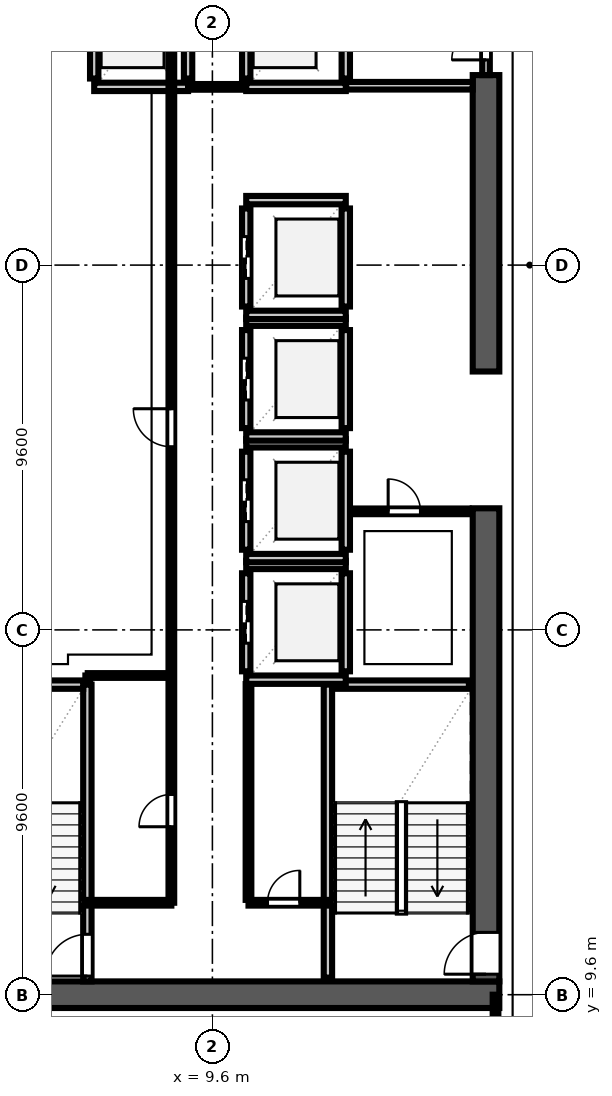
"""IFC4 building model, lengths in metres.
Left out: names, types, materials, properties, quantities, classifications, styles, units other than length and angle.
Written with IfcOpenShell. Run it as: python <this file> out.ifc"""

import sys

from ifc_helpers import new_model, si_unit, direction, frame, frame_2d, origin, place, context, subcontext, project, spatial, rectangle, extrude, element, fill, save


model = new_model("IFC4")
c1 = context("Model", 3, precision=1e-05, world=origin(), true_north=direction((0.0, 1.0)))
c2 = subcontext(c1, "Body", "Model", "MODEL_VIEW")
j1 = project(units=[si_unit("LENGTHUNIT", "METRE"), si_unit("PLANEANGLEUNIT", "RADIAN")], contexts=[c1])
p1 = place(None, origin())
s1 = spatial("IfcSite", under=j1, at=p1, CompositionType="ELEMENT")
p2 = place(p1, origin())
s2 = spatial("IfcBuilding", under=s1, at=p2, CompositionType="ELEMENT")
p3 = place(p2, frame((0.0, 0.0, 190.2)))
s3 = spatial("IfcBuildingStorey", under=s2, at=p3, CompositionType="ELEMENT", Elevation=190.2)
p4 = place(p3, frame((2.55, 9.6, 0.0), z_axis=(0.0, 0.0, 1.0), x_axis=(1.0, 0.0, 0.0)))
e1 = element("IfcWall", 1, at=p4, inside=s3, PredefinedType="SHEAR", context=c2, shape_type="SweptSolid", body=[
    extrude(rectangle(XDim=14.6, YDim=0.7, at=frame_2d((7.3, 0.0))), origin(), (0.0, 0.0, 1.0), 3.48),
])
p5 = place(p3, frame((16.8, 9.95, 0.0), z_axis=(0.0, 0.0, 1.0), x_axis=(0.0, 1.0, 0.0)))
e2 = element("IfcWall", 2, at=p5, inside=s3, PredefinedType="SHEAR", context=c2, shape_type="SweptSolid", body=[
    extrude(rectangle(XDim=12.45, YDim=0.7, at=frame_2d((6.225, 0.0))), origin(), (0.0, 0.0, 1.0), 3.48),
])
p6 = place(p5, frame((0.19, 0.0, 0.0)))
e3 = element("IfcOpeningElement", 3, at=p6, cuts=e2, PredefinedType="OPENING", context=c2, shape_type="SweptSolid", body=[
    extrude(rectangle(XDim=1.1, YDim=2.2, at=frame_2d((0.55, 1.1))), frame((0.0, 0.362, 0.0), z_axis=(0.0, -1.0, 0.0), x_axis=(1.0, 0.0, 0.0)), (0.0, 0.0, 1.0), 0.724),
])
p7 = place(p3, frame((16.8, 26.0, 0.0), z_axis=(0.0, 0.0, 1.0), x_axis=(0.0, 1.0, 0.0)))
e4 = element("IfcWall", 4, at=p7, inside=s3, PredefinedType="SHEAR", context=c2, shape_type="SweptSolid", body=[
    extrude(rectangle(XDim=7.8, YDim=0.7, at=frame_2d((3.9, 0.0))), origin(), (0.0, 0.0, 1.0), 3.48),
])
p8 = place(p3, frame((6.31, 9.95, 0.0), z_axis=(0.0, 0.0, 1.0), x_axis=(0.0, 1.0, 0.0)))
e5 = element("IfcWall", 5, at=p8, inside=s3, PredefinedType="SOLIDWALL", context=c2, shape_type="SweptSolid", body=[
    extrude(rectangle(XDim=7.81, YDim=0.22, at=frame_2d((3.905, 0.0))), origin(), (0.0, 0.0, 1.0), 3.48),
])
p9 = place(p8, frame((0.14, 0.0, 0.0)))
e6 = element("IfcOpeningElement", 6, at=p9, cuts=e5, PredefinedType="OPENING", context=c2, shape_type="SweptSolid", body=[
    extrude(rectangle(XDim=1.1, YDim=2.2, at=frame_2d((0.55, 1.1))), frame((0.0, 0.122, 0.0), z_axis=(0.0, -1.0, 0.0), x_axis=(1.0, 0.0, 0.0)), (0.0, 0.0, 1.0), 0.244),
])
p10 = place(p3, frame((2.65, 17.76, 0.0), z_axis=(0.0, 0.0, 1.0), x_axis=(1.0, 0.0, 0.0)))
e7 = element("IfcWall", 7, at=p10, inside=s3, PredefinedType="SOLIDWALL", context=c2, shape_type="SweptSolid", body=[
    extrude(rectangle(XDim=3.55, YDim=0.22, at=frame_2d((1.775, 0.0))), origin(), (0.0, 0.0, 1.0), 3.48),
])
p11 = place(p3, frame((12.64, 10.05, 0.0), z_axis=(0.0, 0.0, 1.0), x_axis=(0.0, 1.0, 0.0)))
e8 = element("IfcWall", 8, at=p11, inside=s3, PredefinedType="SOLIDWALL", context=c2, shape_type="SweptSolid", body=[
    extrude(rectangle(XDim=7.71, YDim=0.22, at=frame_2d((3.855, 0.0))), origin(), (0.0, 0.0, 1.0), 3.48),
])
p12 = place(p3, frame((12.75, 17.76, 0.0), z_axis=(0.0, 0.0, 1.0), x_axis=(1.0, 0.0, 0.0)))
e9 = element("IfcWall", 9, at=p12, inside=s3, PredefinedType="SOLIDWALL", context=c2, shape_type="SweptSolid", body=[
    extrude(rectangle(XDim=3.6, YDim=0.22, at=frame_2d((1.8, 0.0))), origin(), (0.0, 0.0, 1.0), 3.48),
])
p13 = place(p3, frame((10.49, 18.11, 0.0), z_axis=(0.0, 0.0, 1.0), x_axis=(0.0, 1.0, 0.0)))
e10 = element("IfcWall", 10, at=p13, inside=s3, PredefinedType="SOLIDWALL", context=c2, shape_type="SweptSolid", body=[
    extrude(rectangle(XDim=2.58, YDim=0.22, at=frame_2d((1.29, 0.0))), origin(), (0.0, 0.0, 1.0), 3.48),
])
p14 = place(p13, frame((0.74, 0.0, 0.0)))
e11 = element("IfcOpeningElement", 11, at=p14, cuts=e10, PredefinedType="OPENING", context=c2, shape_type="SweptSolid", body=[
    extrude(rectangle(XDim=1.1, YDim=2.2, at=frame_2d((0.55, 1.1))), frame((0.0, 0.122, 0.0), z_axis=(0.0, -1.0, 0.0), x_axis=(1.0, 0.0, 0.0)), (0.0, 0.0, 1.0), 0.244),
])
p15 = place(p3, frame((13.11, 18.11, 0.0), z_axis=(0.0, 0.0, 1.0), x_axis=(0.0, 1.0, 0.0)))
e12 = element("IfcWall", 12, at=p15, inside=s3, PredefinedType="SOLIDWALL", context=c2, shape_type="SweptSolid", body=[
    extrude(rectangle(XDim=2.58, YDim=0.22, at=frame_2d((1.29, 0.0))), origin(), (0.0, 0.0, 1.0), 3.48),
])
for number, where, z_axis, x_axis in (
    (13, (10.49, 17.89, 0.0), (0.0, 0.0, 1.0), (1.0, 0.0, 0.0)),
    (14, (10.49, 20.91, 0.0), (0.0, 0.0, 1.0), (1.0, 0.0, 0.0)),
):
    element("IfcWall", number, at=place(p3, frame(where, z_axis=z_axis, x_axis=x_axis)), inside=s3, PredefinedType="SOLIDWALL", context=c2, shape_type="SweptSolid", body=[
        extrude(rectangle(XDim=2.62, YDim=0.22, at=frame_2d((1.31, 0.0))), origin(), (0.0, 0.0, 1.0), 3.48),
    ])
p16 = place(p3, frame((10.49, 21.31, 0.0), z_axis=(0.0, 0.0, 1.0), x_axis=(0.0, 1.0, 0.0)))
e15 = element("IfcWall", 15, at=p16, inside=s3, PredefinedType="SOLIDWALL", context=c2, shape_type="SweptSolid", body=[
    extrude(rectangle(XDim=2.58, YDim=0.22, at=frame_2d((1.29, 0.0))), origin(), (0.0, 0.0, 1.0), 3.48),
])
p17 = place(p16, frame((0.74, 0.0, 0.0)))
e16 = element("IfcOpeningElement", 16, at=p17, cuts=e15, PredefinedType="OPENING", context=c2, shape_type="SweptSolid", body=[
    extrude(rectangle(XDim=1.1, YDim=2.2, at=frame_2d((0.55, 1.1))), frame((0.0, 0.122, 0.0), z_axis=(0.0, -1.0, 0.0), x_axis=(1.0, 0.0, 0.0)), (0.0, 0.0, 1.0), 0.244),
])
p18 = place(p3, frame((13.11, 21.31, 0.0), z_axis=(0.0, 0.0, 1.0), x_axis=(0.0, 1.0, 0.0)))
e17 = element("IfcWall", 17, at=p18, inside=s3, PredefinedType="SOLIDWALL", context=c2, shape_type="SweptSolid", body=[
    extrude(rectangle(XDim=2.58, YDim=0.22, at=frame_2d((1.29, 0.0))), origin(), (0.0, 0.0, 1.0), 3.48),
])
for number, where, z_axis, x_axis in (
    (18, (10.49, 21.09, 0.0), (0.0, 0.0, 1.0), (1.0, 0.0, 0.0)),
    (19, (10.49, 24.11, 0.0), (0.0, 0.0, 1.0), (1.0, 0.0, 0.0)),
):
    element("IfcWall", number, at=place(p3, frame(where, z_axis=z_axis, x_axis=x_axis)), inside=s3, PredefinedType="SOLIDWALL", context=c2, shape_type="SweptSolid", body=[
        extrude(rectangle(XDim=2.62, YDim=0.22, at=frame_2d((1.31, 0.0))), origin(), (0.0, 0.0, 1.0), 3.48),
    ])
p19 = place(p3, frame((10.49, 24.51, 0.0), z_axis=(0.0, 0.0, 1.0), x_axis=(0.0, 1.0, 0.0)))
e20 = element("IfcWall", 20, at=p19, inside=s3, PredefinedType="SOLIDWALL", context=c2, shape_type="SweptSolid", body=[
    extrude(rectangle(XDim=2.58, YDim=0.22, at=frame_2d((1.29, 0.0))), origin(), (0.0, 0.0, 1.0), 3.48),
])
p20 = place(p19, frame((0.74, 0.0, 0.0)))
e21 = element("IfcOpeningElement", 21, at=p20, cuts=e20, PredefinedType="OPENING", context=c2, shape_type="SweptSolid", body=[
    extrude(rectangle(XDim=1.1, YDim=2.2, at=frame_2d((0.55, 1.1))), frame((0.0, 0.122, 0.0), z_axis=(0.0, -1.0, 0.0), x_axis=(1.0, 0.0, 0.0)), (0.0, 0.0, 1.0), 0.244),
])
p21 = place(p3, frame((13.11, 24.51, 0.0), z_axis=(0.0, 0.0, 1.0), x_axis=(0.0, 1.0, 0.0)))
e22 = element("IfcWall", 22, at=p21, inside=s3, PredefinedType="SOLIDWALL", context=c2, shape_type="SweptSolid", body=[
    extrude(rectangle(XDim=2.58, YDim=0.22, at=frame_2d((1.29, 0.0))), origin(), (0.0, 0.0, 1.0), 3.48),
])
for number, where, z_axis, x_axis in (
    (23, (10.49, 24.29, 0.0), (0.0, 0.0, 1.0), (1.0, 0.0, 0.0)),
    (24, (10.49, 27.31, 0.0), (0.0, 0.0, 1.0), (1.0, 0.0, 0.0)),
):
    element("IfcWall", number, at=place(p3, frame(where, z_axis=z_axis, x_axis=x_axis)), inside=s3, PredefinedType="SOLIDWALL", context=c2, shape_type="SweptSolid", body=[
        extrude(rectangle(XDim=2.62, YDim=0.22, at=frame_2d((1.31, 0.0))), origin(), (0.0, 0.0, 1.0), 3.48),
    ])
p22 = place(p3, frame((10.49, 27.71, 0.0), z_axis=(0.0, 0.0, 1.0), x_axis=(0.0, 1.0, 0.0)))
e25 = element("IfcWall", 25, at=p22, inside=s3, PredefinedType="SOLIDWALL", context=c2, shape_type="SweptSolid", body=[
    extrude(rectangle(XDim=2.58, YDim=0.22, at=frame_2d((1.29, 0.0))), origin(), (0.0, 0.0, 1.0), 3.48),
])
p23 = place(p22, frame((0.74, 0.0, 0.0)))
e26 = element("IfcOpeningElement", 26, at=p23, cuts=e25, PredefinedType="OPENING", context=c2, shape_type="SweptSolid", body=[
    extrude(rectangle(XDim=1.1, YDim=2.2, at=frame_2d((0.55, 1.1))), frame((0.0, 0.122, 0.0), z_axis=(0.0, -1.0, 0.0), x_axis=(1.0, 0.0, 0.0)), (0.0, 0.0, 1.0), 0.244),
])
p24 = place(p3, frame((13.11, 27.71, 0.0), z_axis=(0.0, 0.0, 1.0), x_axis=(0.0, 1.0, 0.0)))
e27 = element("IfcWall", 27, at=p24, inside=s3, PredefinedType="SOLIDWALL", context=c2, shape_type="SweptSolid", body=[
    extrude(rectangle(XDim=2.58, YDim=0.22, at=frame_2d((1.29, 0.0))), origin(), (0.0, 0.0, 1.0), 3.48),
])
for number, where, z_axis, x_axis in (
    (28, (10.49, 27.49, 0.0), (0.0, 0.0, 1.0), (1.0, 0.0, 0.0)),
    (29, (10.49, 30.51, 0.0), (0.0, 0.0, 1.0), (1.0, 0.0, 0.0)),
):
    element("IfcWall", number, at=place(p3, frame(where, z_axis=z_axis, x_axis=x_axis)), inside=s3, PredefinedType="SOLIDWALL", context=c2, shape_type="SweptSolid", body=[
        extrude(rectangle(XDim=2.62, YDim=0.22, at=frame_2d((1.31, 0.0))), origin(), (0.0, 0.0, 1.0), 3.48),
    ])
for number, where, z_axis, x_axis in (
    (30, (6.49, 33.71, 0.0), (0.0, 0.0, 1.0), (0.0, 1.0, 0.0)),
    (31, (8.96, 33.71, 0.0), (0.0, 0.0, 1.0), (0.0, 1.0, 0.0)),
):
    element("IfcWall", number, at=place(p3, frame(where, z_axis=z_axis, x_axis=x_axis)), inside=s3, PredefinedType="SOLIDWALL", context=c2, shape_type="SweptSolid", body=[
        extrude(rectangle(XDim=2.78, YDim=0.22, at=frame_2d((1.39, 0.0))), origin(), (0.0, 0.0, 1.0), 3.48),
    ])
p25 = place(p3, frame((6.49, 33.49, 0.0), z_axis=(0.0, 0.0, 1.0), x_axis=(1.0, 0.0, 0.0)))
e32 = element("IfcWall", 32, at=p25, inside=s3, PredefinedType="SOLIDWALL", context=c2, shape_type="SweptSolid", body=[
    extrude(rectangle(XDim=2.47, YDim=0.22, at=frame_2d((1.235, 0.0))), origin(), (0.0, 0.0, 1.0), 3.48),
])
for number, where, z_axis, x_axis in (
    (33, (10.49, 33.71, 0.0), (0.0, 0.0, 1.0), (0.0, 1.0, 0.0)),
    (34, (13.11, 33.71, 0.0), (0.0, 0.0, 1.0), (0.0, 1.0, 0.0)),
):
    element("IfcWall", number, at=place(p3, frame(where, z_axis=z_axis, x_axis=x_axis)), inside=s3, PredefinedType="SOLIDWALL", context=c2, shape_type="SweptSolid", body=[
        extrude(rectangle(XDim=2.78, YDim=0.22, at=frame_2d((1.39, 0.0))), origin(), (0.0, 0.0, 1.0), 3.48),
    ])
p26 = place(p3, frame((10.49, 33.49, 0.0), z_axis=(0.0, 0.0, 1.0), x_axis=(1.0, 0.0, 0.0)))
e35 = element("IfcWall", 35, at=p26, inside=s3, PredefinedType="SOLIDWALL", context=c2, shape_type="SweptSolid", body=[
    extrude(rectangle(XDim=2.62, YDim=0.22, at=frame_2d((1.31, 0.0))), origin(), (0.0, 0.0, 1.0), 3.48),
])
p27 = place(p3, frame((13.12, 33.52, 0.0), z_axis=(0.0, 0.0, 1.0), x_axis=(1.0, 0.0, 0.0)))
e36 = element("IfcWall", 36, at=p27, inside=s3, PredefinedType="SOLIDWALL", context=c2, shape_type="SweptSolid", body=[
    extrude(rectangle(XDim=3.33, YDim=0.2, at=frame_2d((1.665, 0.0))), origin(), (0.0, 0.0, 1.0), 3.48),
])
p28 = place(p3, frame((16.8, 33.8, 0.0), z_axis=(0.0, 0.0, 1.0), x_axis=(0.0, 1.0, 0.0)))
e37 = element("IfcWall", 37, at=p28, inside=s3, PredefinedType="SOLIDWALL", context=c2, shape_type="SweptSolid", body=[
    extrude(rectangle(XDim=2.6, YDim=0.2, at=frame_2d((1.3, 0.0))), origin(), (0.0, 0.0, 1.0), 3.48),
])
p29 = place(p28, frame((0.4, 0.0, 0.0)))
e38 = element("IfcOpeningElement", 38, at=p29, cuts=e37, PredefinedType="OPENING", context=c2, shape_type="SweptSolid", body=[
    extrude(rectangle(XDim=1.8, YDim=2.2, at=frame_2d((0.9, 1.1))), frame((0.0, 0.112, 0.0), z_axis=(0.0, -1.0, 0.0), x_axis=(1.0, 0.0, 0.0)), (0.0, 0.0, 1.0), 0.224),
])
p30 = place(p3, frame((8.965, 33.49, 0.0), z_axis=(0.0, 0.0, 1.0), x_axis=(1.0, 0.0, 0.0)))
e39 = element("IfcWall", 39, at=p30, inside=s3, PredefinedType="PARTITIONING", context=c2, shape_type="SweptSolid", body=[
    extrude(rectangle(XDim=1.52, YDim=0.15, at=frame_2d((0.76, 0.0))), origin(), (0.0, 0.0, 1.0), 3.48),
])
p31 = place(p3, frame((10.55, 12.02, 0.0), z_axis=(0.0, 0.0, 1.0), x_axis=(1.0, 0.0, 0.0)))
e40 = element("IfcWall", 40, at=p31, inside=s3, PredefinedType="PARTITIONING", context=c2, shape_type="SweptSolid", body=[
    extrude(rectangle(XDim=2.08, YDim=0.15, at=frame_2d((1.04, 0.0))), origin(), (0.0, 0.0, 1.0), 3.48),
])
p32 = place(p31, frame((0.5, 0.0, 0.0)))
e41 = element("IfcOpeningElement", 41, at=p32, cuts=e40, PredefinedType="OPENING", context=c2, shape_type="SweptSolid", body=[
    extrude(rectangle(XDim=0.85, YDim=2.1, at=frame_2d((0.425, 1.05))), frame((0.0, 0.087, 0.0), z_axis=(0.0, -1.0, 0.0), x_axis=(1.0, 0.0, 0.0)), (0.0, 0.0, 1.0), 0.174),
])
p33 = place(p3, frame((10.55, 12.095, 0.0), z_axis=(0.0, 0.0, 1.0), x_axis=(0.0, 1.0, 0.0)))
e42 = element("IfcWall", 42, at=p33, inside=s3, PredefinedType="PARTITIONING", context=c2, shape_type="SweptSolid", body=[
    extrude(rectangle(XDim=5.68, YDim=0.15, at=frame_2d((2.84, 0.0))), origin(), (0.0, 0.0, 1.0), 3.48),
])
p34 = place(p3, frame((13.225, 22.32, 0.0), z_axis=(0.0, 0.0, 1.0), x_axis=(1.0, 0.0, 0.0)))
e43 = element("IfcWall", 43, at=p34, inside=s3, PredefinedType="PARTITIONING", context=c2, shape_type="SweptSolid", body=[
    extrude(rectangle(XDim=3.12, YDim=0.15, at=frame_2d((1.56, 0.0))), origin(), (0.0, 0.0, 1.0), 3.48),
])
p35 = place(p34, frame((1.0, 0.0, 0.0)))
e44 = element("IfcOpeningElement", 44, at=p35, cuts=e43, PredefinedType="OPENING", context=c2, shape_type="SweptSolid", body=[
    extrude(rectangle(XDim=0.85, YDim=2.1, at=frame_2d((0.425, 1.05))), frame((0.0, 0.087, 0.0), z_axis=(0.0, -1.0, 0.0), x_axis=(1.0, 0.0, 0.0)), (0.0, 0.0, 1.0), 0.174),
])
p36 = place(p3, frame((6.32, 12.02, 0.0), z_axis=(0.0, 0.0, 1.0), x_axis=(1.0, 0.0, 0.0)))
e45 = element("IfcWall", 45, at=p36, inside=s3, PredefinedType="PARTITIONING", context=c2, shape_type="SweptSolid", body=[
    extrude(rectangle(XDim=2.2, YDim=0.15, at=frame_2d((1.1, 0.0))), origin(), (0.0, 0.0, 1.0), 3.48),
])
p37 = place(p3, frame((6.32, 17.8, 0.0), z_axis=(0.0, 0.0, 1.0), x_axis=(0.0, 1.0, 0.0)))
e46 = element("IfcWall", 46, at=p37, inside=s3, PredefinedType="PARTITIONING", context=c2, shape_type="SweptSolid", body=[
    extrude(rectangle(XDim=0.2, YDim=0.125, at=frame_2d((0.1, 0.0))), origin(), (0.0, 0.0, 1.0), 3.48),
])
p38 = place(p3, frame((6.32, 18.0, 0.0), z_axis=(0.0, 0.0, 1.0), x_axis=(1.0, 0.0, 0.0)))
e47 = element("IfcWall", 47, at=p38, inside=s3, PredefinedType="PARTITIONING", context=c2, shape_type="SweptSolid", body=[
    extrude(rectangle(XDim=2.2, YDim=0.125, at=frame_2d((1.1, 0.0))), origin(), (0.0, 0.0, 1.0), 3.48),
])
p39 = place(p3, frame((8.52, 12.02, 0.0), z_axis=(0.0, 0.0, 1.0), x_axis=(0.0, 1.0, 0.0)))
e48 = element("IfcWall", 48, at=p39, inside=s3, PredefinedType="PARTITIONING", context=c2, shape_type="SweptSolid", body=[
    extrude(rectangle(XDim=24.76, YDim=0.15, at=frame_2d((12.38, 0.0))), origin(), (0.0, 0.0, 1.0), 3.48),
])
p40 = place(p39, frame((2.0, 0.0, 0.0)))
e49 = element("IfcOpeningElement", 49, at=p40, cuts=e48, PredefinedType="OPENING", context=c2, shape_type="SweptSolid", body=[
    extrude(rectangle(XDim=0.85, YDim=2.1, at=frame_2d((0.425, 1.05))), frame((0.0, 0.087, 0.0), z_axis=(0.0, -1.0, 0.0), x_axis=(1.0, 0.0, 0.0)), (0.0, 0.0, 1.0), 0.174),
])
p41 = place(p39, frame((12.0, 0.0, 0.0)))
e50 = element("IfcOpeningElement", 50, at=p41, cuts=e48, PredefinedType="OPENING", context=c2, shape_type="SweptSolid", body=[
    extrude(rectangle(XDim=1.0, YDim=2.2, at=frame_2d((0.5, 1.1))), frame((0.0, 0.087, 0.0), z_axis=(0.0, -1.0, 0.0), x_axis=(1.0, 0.0, 0.0)), (0.0, 0.0, 1.0), 0.174),
])
p42 = place(p3, frame((17.05, 0.22, 0.0), z_axis=(0.0, 0.0, 1.0), x_axis=(0.0, 1.0, 0.0)))
e51 = element("IfcWall", 51, at=p42, inside=s3, PredefinedType="PARTITIONING", context=c2, shape_type="SweptSolid", body=[
    extrude(rectangle(XDim=9.38, YDim=0.15, at=frame_2d((4.69, 0.0))), origin(), (0.0, 0.0, 1.0), 3.48),
])
p43 = place(p42, frame((5.58, 0.0, 0.0)))
e52 = element("IfcOpeningElement", 52, at=p43, cuts=e51, PredefinedType="OPENING", context=c2, shape_type="SweptSolid", body=[
    extrude(rectangle(XDim=1.2, YDim=2.2, at=frame_2d((0.6, 1.1))), frame((0.0, 0.087, 0.0), z_axis=(0.0, -1.0, 0.0), x_axis=(1.0, 0.0, 0.0)), (0.0, 0.0, 1.0), 0.174),
])
p44 = place(p9, origin())
e53 = element("IfcDoor", 53, at=p44, inside=s3, OperationType="SINGLE_SWING_LEFT", PredefinedType="DOOR", context=c2, shape_type="SweptSolid", body=[
    extrude(rectangle(XDim=1.1, YDim=2.2, at=frame_2d((0.55, 1.1))), frame((0.0, 0.025, 0.0), z_axis=(0.0, -1.0, 0.0), x_axis=(1.0, 0.0, 0.0)), (0.0, 0.0, 1.0), 0.05),
])
fill(e6, e53)
p45 = place(p6, origin())
e54 = element("IfcDoor", 54, at=p45, inside=s3, OperationType="SINGLE_SWING_LEFT", PredefinedType="DOOR", context=c2, shape_type="SweptSolid", body=[
    extrude(rectangle(XDim=1.1, YDim=2.2, at=frame_2d((0.55, 1.1))), frame((0.0, 0.025, 0.0), z_axis=(0.0, -1.0, 0.0), x_axis=(1.0, 0.0, 0.0)), (0.0, 0.0, 1.0), 0.05),
])
fill(e3, e54)
p46 = place(p14, origin())
e55 = element("IfcDoor", 55, at=p46, inside=s3, OperationType="DOUBLE_DOOR_SLIDING", PredefinedType="DOOR", context=c2, shape_type="SweptSolid", body=[
    extrude(rectangle(XDim=1.1, YDim=2.2, at=frame_2d((0.55, 1.1))), frame((0.0, 0.025, 0.0), z_axis=(0.0, -1.0, 0.0), x_axis=(1.0, 0.0, 0.0)), (0.0, 0.0, 1.0), 0.05),
])
fill(e11, e55)
p47 = place(p17, origin())
e56 = element("IfcDoor", 56, at=p47, inside=s3, OperationType="DOUBLE_DOOR_SLIDING", PredefinedType="DOOR", context=c2, shape_type="SweptSolid", body=[
    extrude(rectangle(XDim=1.1, YDim=2.2, at=frame_2d((0.55, 1.1))), frame((0.0, 0.025, 0.0), z_axis=(0.0, -1.0, 0.0), x_axis=(1.0, 0.0, 0.0)), (0.0, 0.0, 1.0), 0.05),
])
fill(e16, e56)
p48 = place(p20, origin())
e57 = element("IfcDoor", 57, at=p48, inside=s3, OperationType="DOUBLE_DOOR_SLIDING", PredefinedType="DOOR", context=c2, shape_type="SweptSolid", body=[
    extrude(rectangle(XDim=1.1, YDim=2.2, at=frame_2d((0.55, 1.1))), frame((0.0, 0.025, 0.0), z_axis=(0.0, -1.0, 0.0), x_axis=(1.0, 0.0, 0.0)), (0.0, 0.0, 1.0), 0.05),
])
fill(e21, e57)
p49 = place(p23, origin())
e58 = element("IfcDoor", 58, at=p49, inside=s3, OperationType="DOUBLE_DOOR_SLIDING", PredefinedType="DOOR", context=c2, shape_type="SweptSolid", body=[
    extrude(rectangle(XDim=1.1, YDim=2.2, at=frame_2d((0.55, 1.1))), frame((0.0, 0.025, 0.0), z_axis=(0.0, -1.0, 0.0), x_axis=(1.0, 0.0, 0.0)), (0.0, 0.0, 1.0), 0.05),
])
fill(e26, e58)
p50 = place(p29, origin())
e59 = element("IfcDoor", 59, at=p50, inside=s3, OperationType="DOUBLE_DOOR_SINGLE_SWING", PredefinedType="DOOR", context=c2, shape_type="SweptSolid", body=[
    extrude(rectangle(XDim=1.8, YDim=2.2, at=frame_2d((0.9, 1.1))), frame((0.0, 0.025, 0.0), z_axis=(0.0, -1.0, 0.0), x_axis=(1.0, 0.0, 0.0)), (0.0, 0.0, 1.0), 0.05),
])
fill(e38, e59)
p51 = place(p32, origin())
e60 = element("IfcDoor", 60, at=p51, inside=s3, OperationType="SINGLE_SWING_RIGHT", PredefinedType="DOOR", context=c2, shape_type="SweptSolid", body=[
    extrude(rectangle(XDim=0.85, YDim=2.1, at=frame_2d((0.425, 1.05))), frame((0.0, 0.025, 0.0), z_axis=(0.0, -1.0, 0.0), x_axis=(1.0, 0.0, 0.0)), (0.0, 0.0, 1.0), 0.05),
])
fill(e41, e60)
p52 = place(p35, origin())
e61 = element("IfcDoor", 61, at=p52, inside=s3, OperationType="SINGLE_SWING_LEFT", PredefinedType="DOOR", context=c2, shape_type="SweptSolid", body=[
    extrude(rectangle(XDim=0.85, YDim=2.1, at=frame_2d((0.425, 1.05))), frame((0.0, 0.025, 0.0), z_axis=(0.0, -1.0, 0.0), x_axis=(1.0, 0.0, 0.0)), (0.0, 0.0, 1.0), 0.05),
])
fill(e44, e61)
p53 = place(p40, origin())
e62 = element("IfcDoor", 62, at=p53, inside=s3, OperationType="SINGLE_SWING_LEFT", PredefinedType="DOOR", context=c2, shape_type="SweptSolid", body=[
    extrude(rectangle(XDim=0.85, YDim=2.1, at=frame_2d((0.425, 1.05))), frame((0.0, 0.025, 0.0), z_axis=(0.0, -1.0, 0.0), x_axis=(1.0, 0.0, 0.0)), (0.0, 0.0, 1.0), 0.05),
])
fill(e49, e62)
p54 = place(p41, origin())
e63 = element("IfcDoor", 63, at=p54, inside=s3, OperationType="SINGLE_SWING_RIGHT", PredefinedType="DOOR", context=c2, shape_type="SweptSolid", body=[
    extrude(rectangle(XDim=1.0, YDim=2.2, at=frame_2d((0.5, 1.1))), frame((0.0, 0.025, 0.0), z_axis=(0.0, -1.0, 0.0), x_axis=(1.0, 0.0, 0.0)), (0.0, 0.0, 1.0), 0.05),
])
fill(e50, e63)
save(model, sys.argv[1])
